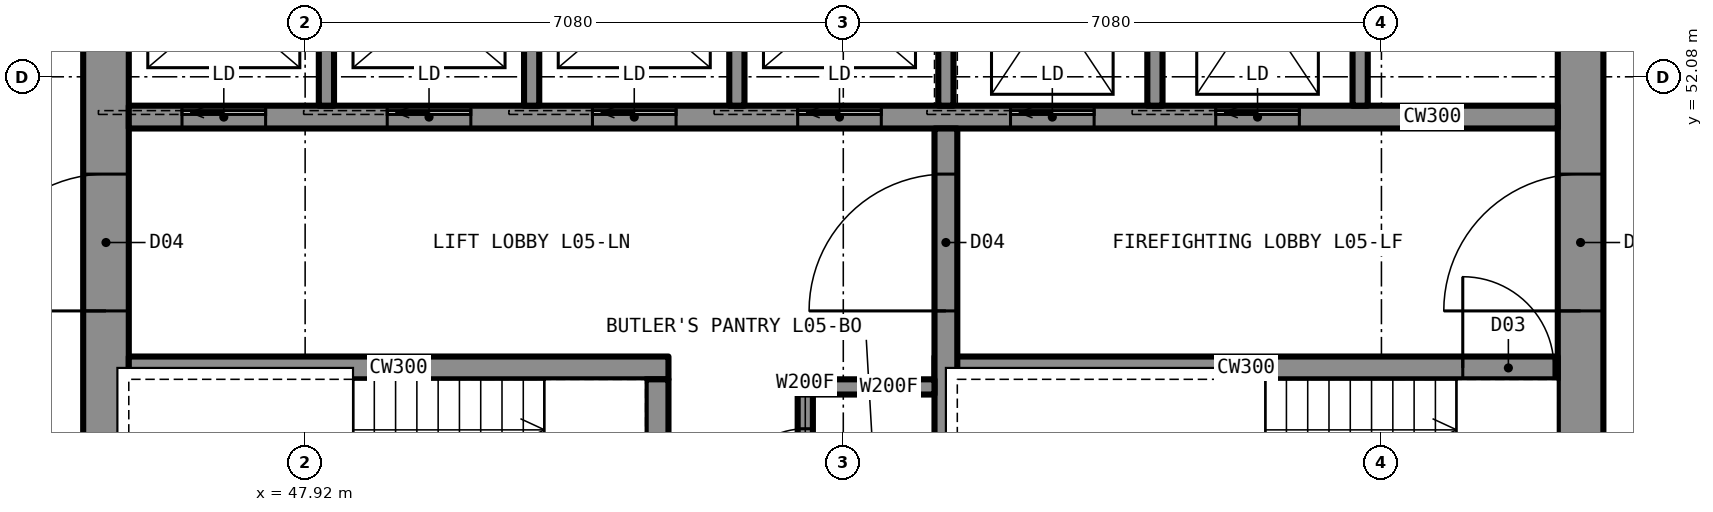
"""IFC4 building model, lengths in metres.
Left out: names, types, materials, properties, quantities, classifications, styles, units other than length and angle.
Written with IfcOpenShell. Run it as: python <this file> out.ifc"""

import sys

from ifc_helpers import new_model, si_unit, direction, frame, frame_2d, origin, place, context, subcontext, project, spatial, rectangle, extrude, element, fill, save


model = new_model("IFC4")
c1 = context("Model", 3, precision=1e-05, world=origin(), true_north=direction((0.0, 1.0)))
c2 = subcontext(c1, "Body", "Model", "MODEL_VIEW")
j1 = project(units=[si_unit("LENGTHUNIT", "METRE"), si_unit("PLANEANGLEUNIT", "RADIAN")], contexts=[c1])
p1 = place(None, origin())
s1 = spatial("IfcSite", under=j1, at=p1, CompositionType="ELEMENT")
p2 = place(p1, origin())
s2 = spatial("IfcBuilding", under=s1, at=p2, CompositionType="ELEMENT")
p3 = place(p2, frame((0.0, 0.0, 25.0)))
s3 = spatial("IfcBuildingStorey", under=s2, at=p3, CompositionType="ELEMENT", Elevation=25.0)
p4 = place(p3, frame((64.7, 35.6, 0.0), z_axis=(0.0, 0.0, 1.0), x_axis=(0.0, 1.0, 0.0)))
e1 = element("IfcWall", 1, at=p4, inside=s3, PredefinedType="SHEAR", context=c2, shape_type="SweptSolid", body=[
    extrude(rectangle(XDim=18.8, YDim=0.6, at=frame_2d((9.4, 0.0))), origin(), (0.0, 0.0, 1.0), 3.5),
])
p5 = place(p4, frame((13.4, 0.0, 0.0)))
e2 = element("IfcOpeningElement", 2, at=p5, cuts=e1, PredefinedType="OPENING", context=c2, shape_type="SweptSolid", body=[
    extrude(rectangle(XDim=1.8, YDim=2.2, at=frame_2d((0.9, 1.1))), frame((0.0, 0.31, 0.0), z_axis=(0.0, -1.0, 0.0), x_axis=(1.0, 0.0, 0.0)), (0.0, 0.0, 1.0), 0.62),
])
p6 = place(p4, frame((3.6, 0.0, 0.0)))
e3 = element("IfcOpeningElement", 3, at=p6, cuts=e1, PredefinedType="OPENING", context=c2, shape_type="SweptSolid", body=[
    extrude(rectangle(XDim=1.8, YDim=2.2, at=frame_2d((0.9, 1.1))), frame((0.0, 0.31, 0.0), z_axis=(0.0, -1.0, 0.0), x_axis=(1.0, 0.0, 0.0)), (0.0, 0.0, 1.0), 0.62),
])
p7 = place(p3, frame((45.3, 35.6, 0.0), z_axis=(0.0, 0.0, 1.0), x_axis=(0.0, 1.0, 0.0)))
e4 = element("IfcWall", 4, at=p7, inside=s3, PredefinedType="SHEAR", context=c2, shape_type="SweptSolid", body=[
    extrude(rectangle(XDim=18.8, YDim=0.6, at=frame_2d((9.4, 0.0))), origin(), (0.0, 0.0, 1.0), 3.5),
])
p8 = place(p7, frame((13.4, 0.0, 0.0)))
e5 = element("IfcOpeningElement", 5, at=p8, cuts=e4, PredefinedType="OPENING", context=c2, shape_type="SweptSolid", body=[
    extrude(rectangle(XDim=1.8, YDim=2.2, at=frame_2d((0.9, 1.1))), frame((0.0, 0.31, 0.0), z_axis=(0.0, -1.0, 0.0), x_axis=(1.0, 0.0, 0.0)), (0.0, 0.0, 1.0), 0.62),
])
p9 = place(p7, frame((3.6, 0.0, 0.0)))
e6 = element("IfcOpeningElement", 6, at=p9, cuts=e4, PredefinedType="OPENING", context=c2, shape_type="SweptSolid", body=[
    extrude(rectangle(XDim=1.8, YDim=2.2, at=frame_2d((0.9, 1.1))), frame((0.0, 0.31, 0.0), z_axis=(0.0, -1.0, 0.0), x_axis=(1.0, 0.0, 0.0)), (0.0, 0.0, 1.0), 0.62),
])
p10 = place(p7, frame((6.4, 0.0, 0.0)))
e7 = element("IfcOpeningElement", 7, at=p10, cuts=e4, PredefinedType="OPENING", context=c2, shape_type="SweptSolid", body=[
    extrude(rectangle(XDim=1.2, YDim=2.2, at=frame_2d((0.6, 1.1))), frame((0.0, 0.31, 0.0), z_axis=(0.0, -1.0, 0.0), x_axis=(1.0, 0.0, 0.0)), (0.0, 0.0, 1.0), 0.62),
])
p11 = place(p3, frame((45.6, 51.55, 0.0), z_axis=(0.0, 0.0, 1.0), x_axis=(1.0, 0.0, 0.0)))
e8 = element("IfcWall", 8, at=p11, inside=s3, PredefinedType="SHEAR", context=c2, shape_type="SweptSolid", body=[
    extrude(rectangle(XDim=18.8, YDim=0.3, at=frame_2d((9.4, 0.0))), origin(), (0.0, 0.0, 1.0), 3.5),
])
p12 = place(p11, frame((0.7, 0.0, 0.0)))
e9 = element("IfcOpeningElement", 9, at=p12, cuts=e8, PredefinedType="OPENING", context=c2, shape_type="SweptSolid", body=[
    extrude(rectangle(XDim=1.1, YDim=2.2, at=frame_2d((0.55, 1.1))), frame((0.0, 0.16, 0.0), z_axis=(0.0, -1.0, 0.0), x_axis=(1.0, 0.0, 0.0)), (0.0, 0.0, 1.0), 0.32),
])
p13 = place(p11, frame((3.4, 0.0, 0.0)))
e10 = element("IfcOpeningElement", 10, at=p13, cuts=e8, PredefinedType="OPENING", context=c2, shape_type="SweptSolid", body=[
    extrude(rectangle(XDim=1.1, YDim=2.2, at=frame_2d((0.55, 1.1))), frame((0.0, 0.16, 0.0), z_axis=(0.0, -1.0, 0.0), x_axis=(1.0, 0.0, 0.0)), (0.0, 0.0, 1.0), 0.32),
])
p14 = place(p11, frame((6.1, 0.0, 0.0)))
e11 = element("IfcOpeningElement", 11, at=p14, cuts=e8, PredefinedType="OPENING", context=c2, shape_type="SweptSolid", body=[
    extrude(rectangle(XDim=1.1, YDim=2.2, at=frame_2d((0.55, 1.1))), frame((0.0, 0.16, 0.0), z_axis=(0.0, -1.0, 0.0), x_axis=(1.0, 0.0, 0.0)), (0.0, 0.0, 1.0), 0.32),
])
p15 = place(p11, frame((8.8, 0.0, 0.0)))
e12 = element("IfcOpeningElement", 12, at=p15, cuts=e8, PredefinedType="OPENING", context=c2, shape_type="SweptSolid", body=[
    extrude(rectangle(XDim=1.1, YDim=2.2, at=frame_2d((0.55, 1.1))), frame((0.0, 0.16, 0.0), z_axis=(0.0, -1.0, 0.0), x_axis=(1.0, 0.0, 0.0)), (0.0, 0.0, 1.0), 0.32),
])
p16 = place(p11, frame((11.6, 0.0, 0.0)))
e13 = element("IfcOpeningElement", 13, at=p16, cuts=e8, PredefinedType="OPENING", context=c2, shape_type="SweptSolid", body=[
    extrude(rectangle(XDim=1.1, YDim=2.2, at=frame_2d((0.55, 1.1))), frame((0.0, 0.16, 0.0), z_axis=(0.0, -1.0, 0.0), x_axis=(1.0, 0.0, 0.0)), (0.0, 0.0, 1.0), 0.32),
])
p17 = place(p11, frame((14.3, 0.0, 0.0)))
e14 = element("IfcOpeningElement", 14, at=p17, cuts=e8, PredefinedType="OPENING", context=c2, shape_type="SweptSolid", body=[
    extrude(rectangle(XDim=1.1, YDim=2.2, at=frame_2d((0.55, 1.1))), frame((0.0, 0.16, 0.0), z_axis=(0.0, -1.0, 0.0), x_axis=(1.0, 0.0, 0.0)), (0.0, 0.0, 1.0), 0.32),
])
p18 = place(p3, frame((45.6, 48.25, 0.0), z_axis=(0.0, 0.0, 1.0), x_axis=(1.0, 0.0, 0.0)))
e15 = element("IfcWall", 15, at=p18, inside=s3, PredefinedType="SHEAR", context=c2, shape_type="SweptSolid", body=[
    extrude(rectangle(XDim=7.1, YDim=0.3, at=frame_2d((3.55, 0.0))), origin(), (0.0, 0.0, 1.0), 3.5),
])
p19 = place(p3, frame((56.2, 48.25, 0.0), z_axis=(0.0, 0.0, 1.0), x_axis=(1.0, 0.0, 0.0)))
e16 = element("IfcWall", 16, at=p19, inside=s3, PredefinedType="SHEAR", context=c2, shape_type="SweptSolid", body=[
    extrude(rectangle(XDim=8.2, YDim=0.3, at=frame_2d((4.1, 0.0))), origin(), (0.0, 0.0, 1.0), 3.5),
])
p20 = place(p19, frame((6.95, 0.0, 0.0)))
e17 = element("IfcOpeningElement", 17, at=p20, cuts=e16, PredefinedType="OPENING", context=c2, shape_type="SweptSolid", body=[
    extrude(rectangle(XDim=1.2, YDim=2.2, at=frame_2d((0.6, 1.1))), frame((0.0, 0.16, 0.0), z_axis=(0.0, -1.0, 0.0), x_axis=(1.0, 0.0, 0.0)), (0.0, 0.0, 1.0), 0.32),
])
p21 = place(p3, frame((52.55, 41.9, 0.0), z_axis=(0.0, 0.0, 1.0), x_axis=(0.0, 1.0, 0.0)))
e18 = element("IfcWall", 18, at=p21, inside=s3, PredefinedType="SHEAR", context=c2, shape_type="SweptSolid", body=[
    extrude(rectangle(XDim=6.2, YDim=0.3, at=frame_2d((3.1, 0.0))), origin(), (0.0, 0.0, 1.0), 3.5),
])
p22 = place(p21, frame((4.125, 0.0, 0.0)))
e19 = element("IfcOpeningElement", 19, at=p22, cuts=e18, PredefinedType="OPENING", context=c2, shape_type="SweptSolid", body=[
    extrude(rectangle(XDim=1.2, YDim=2.2, at=frame_2d((0.6, 1.1))), frame((0.0, 0.16, 0.0), z_axis=(0.0, -1.0, 0.0), x_axis=(1.0, 0.0, 0.0)), (0.0, 0.0, 1.0), 0.32),
])
p23 = place(p3, frame((56.35, 41.9, 0.0), z_axis=(0.0, 0.0, 1.0), x_axis=(0.0, 1.0, 0.0)))
e20 = element("IfcWall", 20, at=p23, inside=s3, PredefinedType="SHEAR", context=c2, shape_type="SweptSolid", body=[
    extrude(rectangle(XDim=9.5, YDim=0.3, at=frame_2d((4.75, 0.0))), origin(), (0.0, 0.0, 1.0), 3.5),
])
p24 = place(p23, frame((7.1, 0.0, 0.0)))
e21 = element("IfcOpeningElement", 21, at=p24, cuts=e20, PredefinedType="OPENING", context=c2, shape_type="SweptSolid", body=[
    extrude(rectangle(XDim=1.8, YDim=2.2, at=frame_2d((0.9, 1.1))), frame((0.0, 0.16, 0.0), z_axis=(0.0, -1.0, 0.0), x_axis=(1.0, 0.0, 0.0)), (0.0, 0.0, 1.0), 0.32),
])
p25 = place(p3, frame((54.5, 45.9, 0.0), z_axis=(0.0, 0.0, 1.0), x_axis=(0.0, 1.0, 0.0)))
e22 = element("IfcWall", 22, at=p25, inside=s3, PredefinedType="PARTITIONING", context=c2, shape_type="SweptSolid", body=[
    extrude(rectangle(XDim=2.1, YDim=0.2, at=frame_2d((1.05, 0.0))), origin(), (0.0, 0.0, 1.0), 3.33),
])
p26 = place(p25, frame((0.55, 0.0, 0.0)))
e23 = element("IfcOpeningElement", 23, at=p26, cuts=e22, PredefinedType="OPENING", context=c2, shape_type="SweptSolid", body=[
    extrude(rectangle(XDim=1.0, YDim=2.1, at=frame_2d((0.5, 1.05))), frame((0.0, 0.11, 0.0), z_axis=(0.0, -1.0, 0.0), x_axis=(1.0, 0.0, 0.0)), (0.0, 0.0, 1.0), 0.22),
])
p27 = place(p3, frame((54.4, 48.0, 0.0), z_axis=(0.0, 0.0, 1.0), x_axis=(1.0, 0.0, 0.0)))
e24 = element("IfcWall", 24, at=p27, inside=s3, PredefinedType="PARTITIONING", context=c2, shape_type="SweptSolid", body=[
    extrude(rectangle(XDim=1.8, YDim=0.2, at=frame_2d((0.9, 0.0))), origin(), (0.0, 0.0, 1.0), 3.33),
])
for number, where, z_axis, x_axis in (
    (25, (48.2, 51.7, 0.0), (0.0, 0.0, 1.0), (0.0, 1.0, 0.0)),
    (26, (50.9, 51.7, 0.0), (0.0, 0.0, 1.0), (0.0, 1.0, 0.0)),
    (27, (53.6, 51.7, 0.0), (0.0, 0.0, 1.0), (0.0, 1.0, 0.0)),
    (28, (59.1, 51.7, 0.0), (0.0, 0.0, 1.0), (0.0, 1.0, 0.0)),
    (29, (61.8, 51.7, 0.0), (0.0, 0.0, 1.0), (0.0, 1.0, 0.0)),
    (30, (56.35, 51.7, 0.0), (0.0, 0.0, 1.0), (0.0, 1.0, 0.0)),
):
    element("IfcWall", number, at=place(p3, frame(where, z_axis=z_axis, x_axis=x_axis)), inside=s3, PredefinedType="PARTITIONING", context=c2, shape_type="SweptSolid", body=[
        extrude(rectangle(XDim=2.7, YDim=0.2, at=frame_2d((1.35, 0.0))), origin(), (0.0, 0.0, 1.0), 3.33),
    ])
p28 = place(p26, origin())
e31 = element("IfcDoor", 31, at=p28, inside=s3, OperationType="SINGLE_SWING_LEFT", PredefinedType="DOOR", context=c2, shape_type="SweptSolid", body=[
    extrude(rectangle(XDim=1.0, YDim=2.1, at=frame_2d((0.5, 1.05))), frame((0.0, 0.025, 0.0), z_axis=(0.0, -1.0, 0.0), x_axis=(1.0, 0.0, 0.0)), (0.0, 0.0, 1.0), 0.05),
])
fill(e23, e31)
p29 = place(p8, origin())
e32 = element("IfcDoor", 32, at=p29, inside=s3, OperationType="DOUBLE_DOOR_SINGLE_SWING", PredefinedType="DOOR", context=c2, shape_type="SweptSolid", body=[
    extrude(rectangle(XDim=1.8, YDim=2.2, at=frame_2d((0.9, 1.1))), frame((0.0, 0.025, 0.0), z_axis=(0.0, -1.0, 0.0), x_axis=(1.0, 0.0, 0.0)), (0.0, 0.0, 1.0), 0.05),
])
fill(e5, e32)
p30 = place(p5, origin())
e33 = element("IfcDoor", 33, at=p30, inside=s3, OperationType="DOUBLE_DOOR_SINGLE_SWING", PredefinedType="DOOR", context=c2, shape_type="SweptSolid", body=[
    extrude(rectangle(XDim=1.8, YDim=2.2, at=frame_2d((0.9, 1.1))), frame((0.0, 0.025, 0.0), z_axis=(0.0, -1.0, 0.0), x_axis=(1.0, 0.0, 0.0)), (0.0, 0.0, 1.0), 0.05),
])
fill(e2, e33)
p31 = place(p24, origin())
e34 = element("IfcDoor", 34, at=p31, inside=s3, OperationType="DOUBLE_DOOR_SINGLE_SWING", PredefinedType="DOOR", context=c2, shape_type="SweptSolid", body=[
    extrude(rectangle(XDim=1.8, YDim=2.2, at=frame_2d((0.9, 1.1))), frame((0.0, 0.025, 0.0), z_axis=(0.0, -1.0, 0.0), x_axis=(1.0, 0.0, 0.0)), (0.0, 0.0, 1.0), 0.05),
])
fill(e21, e34)
p32 = place(p20, origin())
e35 = element("IfcDoor", 35, at=p32, inside=s3, OperationType="SINGLE_SWING_LEFT", PredefinedType="DOOR", context=c2, shape_type="SweptSolid", body=[
    extrude(rectangle(XDim=1.2, YDim=2.2, at=frame_2d((0.6, 1.1))), frame((0.0, 0.025, 0.0), z_axis=(0.0, -1.0, 0.0), x_axis=(1.0, 0.0, 0.0)), (0.0, 0.0, 1.0), 0.05),
])
fill(e17, e35)
p33 = place(p12, origin())
e36 = element("IfcDoor", 36, at=p33, inside=s3, OperationType="SLIDING_TO_LEFT", PredefinedType="DOOR", context=c2, shape_type="SweptSolid", body=[
    extrude(rectangle(XDim=1.1, YDim=2.2, at=frame_2d((0.55, 1.1))), frame((0.0, 0.025, 0.0), z_axis=(0.0, -1.0, 0.0), x_axis=(1.0, 0.0, 0.0)), (0.0, 0.0, 1.0), 0.05),
])
fill(e9, e36)
p34 = place(p13, origin())
e37 = element("IfcDoor", 37, at=p34, inside=s3, OperationType="SLIDING_TO_LEFT", PredefinedType="DOOR", context=c2, shape_type="SweptSolid", body=[
    extrude(rectangle(XDim=1.1, YDim=2.2, at=frame_2d((0.55, 1.1))), frame((0.0, 0.025, 0.0), z_axis=(0.0, -1.0, 0.0), x_axis=(1.0, 0.0, 0.0)), (0.0, 0.0, 1.0), 0.05),
])
fill(e10, e37)
p35 = place(p14, origin())
e38 = element("IfcDoor", 38, at=p35, inside=s3, OperationType="SLIDING_TO_LEFT", PredefinedType="DOOR", context=c2, shape_type="SweptSolid", body=[
    extrude(rectangle(XDim=1.1, YDim=2.2, at=frame_2d((0.55, 1.1))), frame((0.0, 0.025, 0.0), z_axis=(0.0, -1.0, 0.0), x_axis=(1.0, 0.0, 0.0)), (0.0, 0.0, 1.0), 0.05),
])
fill(e11, e38)
p36 = place(p15, origin())
e39 = element("IfcDoor", 39, at=p36, inside=s3, OperationType="SLIDING_TO_LEFT", PredefinedType="DOOR", context=c2, shape_type="SweptSolid", body=[
    extrude(rectangle(XDim=1.1, YDim=2.2, at=frame_2d((0.55, 1.1))), frame((0.0, 0.025, 0.0), z_axis=(0.0, -1.0, 0.0), x_axis=(1.0, 0.0, 0.0)), (0.0, 0.0, 1.0), 0.05),
])
fill(e12, e39)
p37 = place(p16, origin())
e40 = element("IfcDoor", 40, at=p37, inside=s3, OperationType="SLIDING_TO_LEFT", PredefinedType="DOOR", context=c2, shape_type="SweptSolid", body=[
    extrude(rectangle(XDim=1.1, YDim=2.2, at=frame_2d((0.55, 1.1))), frame((0.0, 0.025, 0.0), z_axis=(0.0, -1.0, 0.0), x_axis=(1.0, 0.0, 0.0)), (0.0, 0.0, 1.0), 0.05),
])
fill(e13, e40)
p38 = place(p17, origin())
e41 = element("IfcDoor", 41, at=p38, inside=s3, OperationType="SLIDING_TO_LEFT", PredefinedType="DOOR", context=c2, shape_type="SweptSolid", body=[
    extrude(rectangle(XDim=1.1, YDim=2.2, at=frame_2d((0.55, 1.1))), frame((0.0, 0.025, 0.0), z_axis=(0.0, -1.0, 0.0), x_axis=(1.0, 0.0, 0.0)), (0.0, 0.0, 1.0), 0.05),
])
fill(e14, e41)
save(model, sys.argv[1])
